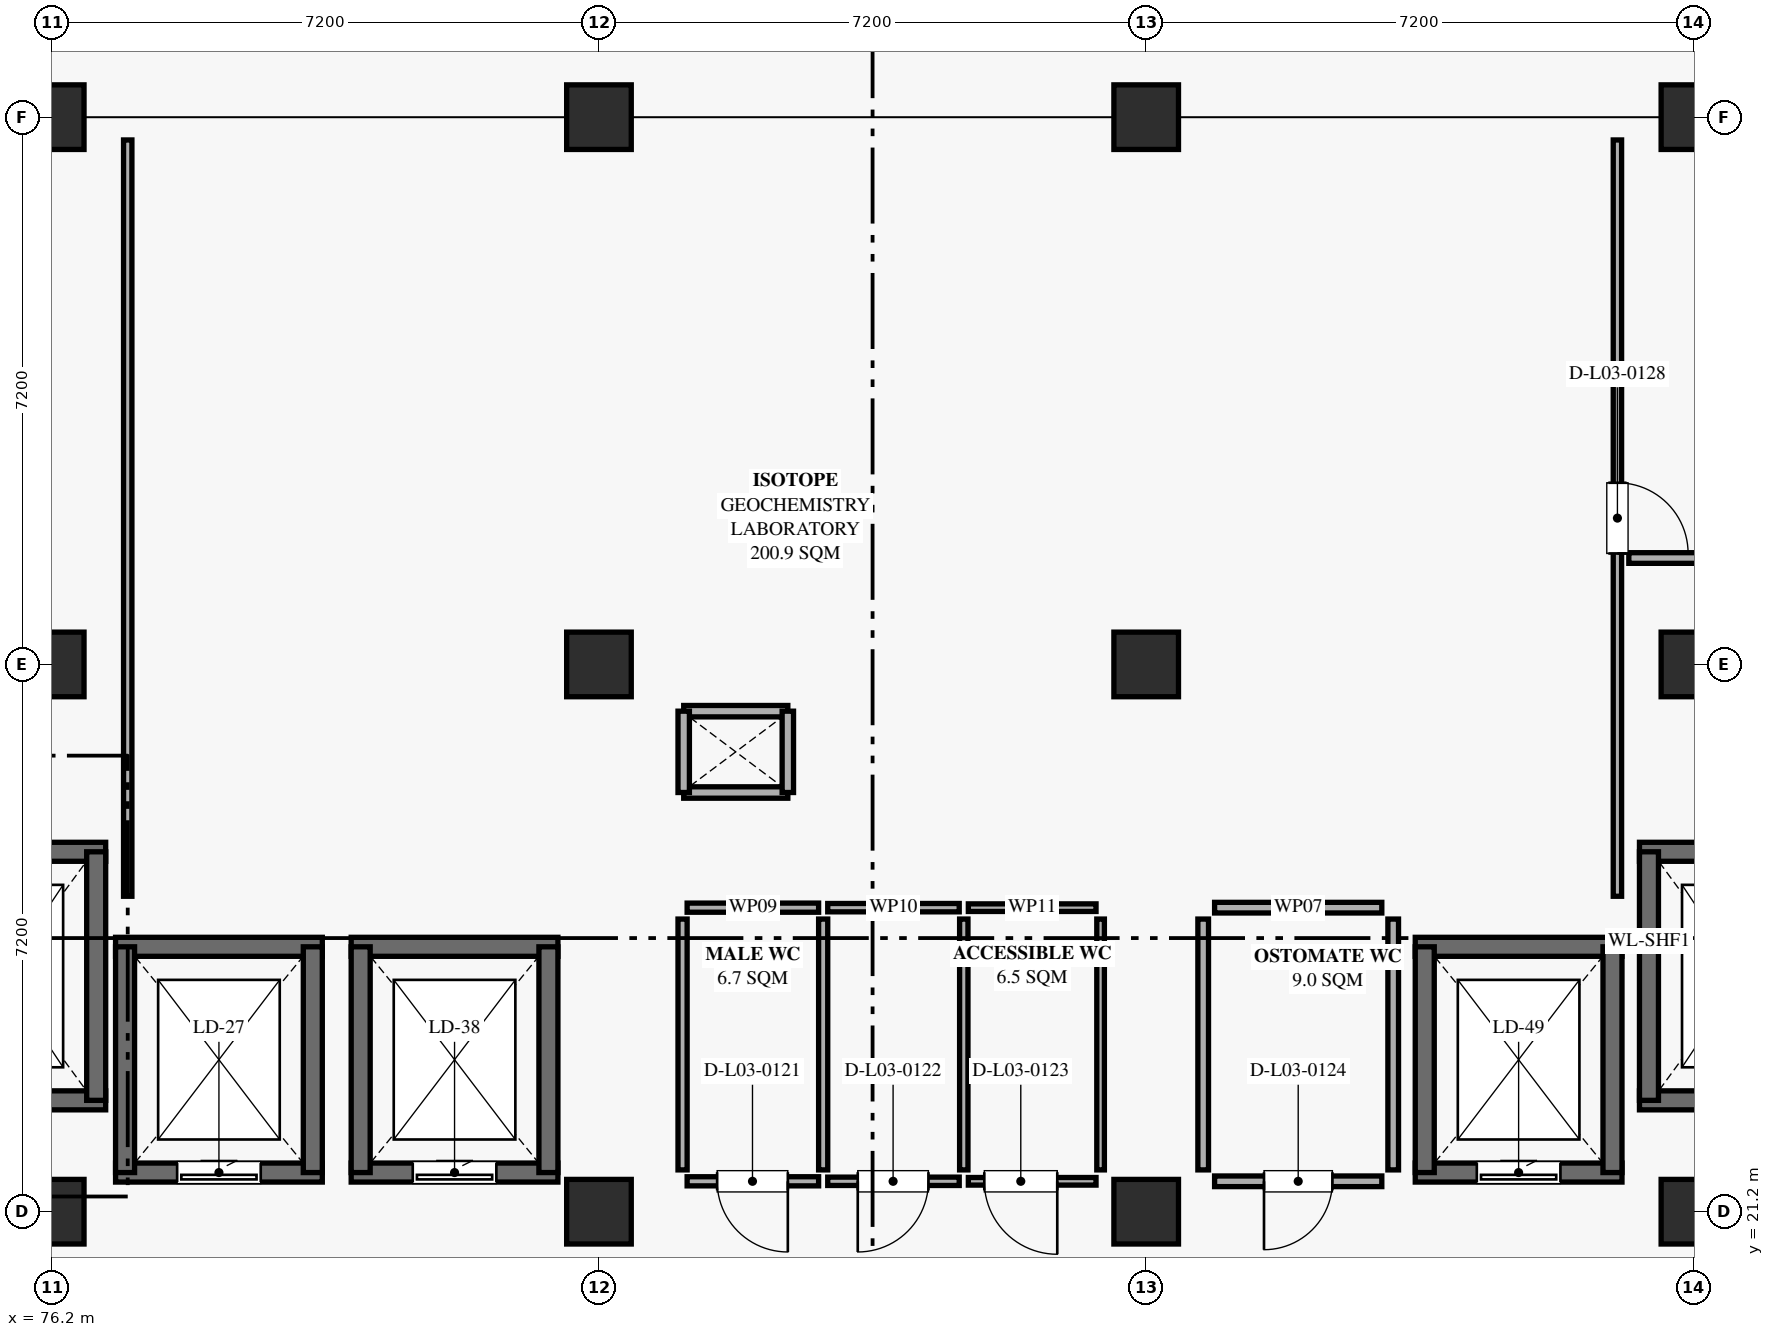
"""IFC4 building model, lengths in metres.
Left out: names, types, materials, properties, quantities, classifications, styles, units other than length and angle.
Written with IfcOpenShell. Run it as: python <this file> out.ifc"""

import sys

from ifc_helpers import new_model, si_unit, direction, frame, frame_2d, origin, origin_2d, place, context, subcontext, project, spatial, rectangle, extrude, element, fill, save


model = new_model("IFC4")
c1 = context("Model", 3, precision=1e-05, world=origin(), true_north=direction((0.0, 1.0)))
c2 = subcontext(c1, "Body", "Model", "MODEL_VIEW")
j1 = project(units=[si_unit("LENGTHUNIT", "METRE"), si_unit("PLANEANGLEUNIT", "RADIAN")], contexts=[c1])
p1 = place(None, origin())
s1 = spatial("IfcSite", under=j1, at=p1, CompositionType="ELEMENT")
p2 = place(p1, origin())
s2 = spatial("IfcBuilding", under=s1, at=p2, CompositionType="ELEMENT")
p3 = place(p2, frame((0.0, 0.0, 15.12)))
s3 = spatial("IfcBuildingStorey", under=s2, at=p3, CompositionType="ELEMENT", Elevation=15.12)
for number, where, z_axis, x_axis in (
    (1, (76.2, 21.2, 0.0), (0.0, 0.0, 1.0), (1.0, 0.0, 0.0)),
    (2, (83.4, 21.2, 0.0), (0.0, 0.0, 1.0), (1.0, 0.0, 0.0)),
    (3, (90.6, 21.2, 0.0), (0.0, 0.0, 1.0), (1.0, 0.0, 0.0)),
    (4, (97.8, 21.2, 0.0), (0.0, 0.0, 1.0), (1.0, 0.0, 0.0)),
    (5, (76.2, 28.4, 0.0), (0.0, 0.0, 1.0), (1.0, 0.0, 0.0)),
    (6, (83.4, 28.4, 0.0), (0.0, 0.0, 1.0), (1.0, 0.0, 0.0)),
    (7, (90.6, 28.4, 0.0), (0.0, 0.0, 1.0), (1.0, 0.0, 0.0)),
    (8, (97.8, 28.4, 0.0), (0.0, 0.0, 1.0), (1.0, 0.0, 0.0)),
    (9, (76.2, 35.6, 0.0), (0.0, 0.0, 1.0), (1.0, 0.0, 0.0)),
    (10, (83.4, 35.6, 0.0), (0.0, 0.0, 1.0), (1.0, 0.0, 0.0)),
    (11, (90.6, 35.6, 0.0), (0.0, 0.0, 1.0), (1.0, 0.0, 0.0)),
    (12, (97.8, 35.6, 0.0), (0.0, 0.0, 1.0), (1.0, 0.0, 0.0)),
):
    element("IfcColumn", number, at=place(p3, frame(where, z_axis=z_axis, x_axis=x_axis)), inside=s3, PredefinedType="COLUMN", context=c2, shape_type="SweptSolid", body=[
        extrude(rectangle(XDim=0.85, YDim=0.85, at=origin_2d()), origin(), (0.0, 0.0, 1.0), 4.68),
    ])
for number, where, z_axis, x_axis in (
    (13, (85.885, 26.715, 0.0), (0.0, 0.0, 1.0), (-1.0, 0.0, 0.0)),
    (14, (84.515, 27.785, 0.0), (0.0, 0.0, 1.0), (1.0, 0.0, 0.0)),
):
    element("IfcWall", number, at=place(p3, frame(where, z_axis=z_axis, x_axis=x_axis)), inside=s3, PredefinedType="PARTITIONING", context=c2, shape_type="SweptSolid", body=[
        extrude(rectangle(XDim=1.37, YDim=0.15, at=frame_2d((0.685, 0.0))), origin(), (0.0, 0.0, 1.0), 3.16),
    ])
for number, where, z_axis, x_axis in (
    (15, (84.515, 26.715, 0.0), (0.0, 0.0, 1.0), (0.0, 1.0, 0.0)),
    (16, (85.885, 27.785, 0.0), (0.0, 0.0, 1.0), (0.0, -1.0, 0.0)),
):
    element("IfcWall", number, at=place(p3, frame(where, z_axis=z_axis, x_axis=x_axis)), inside=s3, PredefinedType="PARTITIONING", context=c2, shape_type="SweptSolid", body=[
        extrude(rectangle(XDim=1.07, YDim=0.15, at=frame_2d((0.535, 0.0))), origin(), (0.0, 0.0, 1.0), 3.16),
    ])
for number, where, z_axis, x_axis in (
    (17, (76.91, 22.665, 0.0), (0.0, 0.0, 1.0), (-1.0, 0.0, 0.0)),
    (18, (74.19, 25.935, 0.0), (0.0, 0.0, 1.0), (1.0, 0.0, 0.0)),
):
    element("IfcWall", number, at=place(p3, frame(where, z_axis=z_axis, x_axis=x_axis)), inside=s3, PredefinedType="SHEAR", context=c2, shape_type="SweptSolid", body=[
        extrude(rectangle(XDim=2.72, YDim=0.25, at=frame_2d((1.36, 0.0))), origin(), (0.0, 0.0, 1.0), 4.41),
    ])
p4 = place(p3, frame((76.785, 25.935, 0.0), z_axis=(0.0, 0.0, 1.0), x_axis=(0.0, -1.0, 0.0)))
e19 = element("IfcWall", 19, at=p4, inside=s3, PredefinedType="SHEAR", context=c2, shape_type="SweptSolid", body=[
    extrude(rectangle(XDim=3.27, YDim=0.25, at=frame_2d((1.635, 0.0))), origin(), (0.0, 0.0, 1.0), 4.41),
])
for number, where, z_axis, x_axis in (
    (20, (99.81, 22.665, 0.0), (0.0, 0.0, 1.0), (-1.0, 0.0, 0.0)),
    (21, (97.09, 25.935, 0.0), (0.0, 0.0, 1.0), (1.0, 0.0, 0.0)),
):
    element("IfcWall", number, at=place(p3, frame(where, z_axis=z_axis, x_axis=x_axis)), inside=s3, PredefinedType="SHEAR", context=c2, shape_type="SweptSolid", body=[
        extrude(rectangle(XDim=2.72, YDim=0.25, at=frame_2d((1.36, 0.0))), origin(), (0.0, 0.0, 1.0), 4.41),
    ])
p5 = place(p3, frame((97.215, 22.665, 0.0), z_axis=(0.0, 0.0, 1.0), x_axis=(0.0, 1.0, 0.0)))
e22 = element("IfcWall", 22, at=p5, inside=s3, PredefinedType="SHEAR", context=c2, shape_type="SweptSolid", body=[
    extrude(rectangle(XDim=3.27, YDim=0.25, at=frame_2d((1.635, 0.0))), origin(), (0.0, 0.0, 1.0), 4.41),
])
p6 = place(p3, frame((79.76, 21.715, 0.0), z_axis=(0.0, 0.0, 1.0), x_axis=(-1.0, 0.0, 0.0)))
e23 = element("IfcWall", 23, at=p6, inside=s3, PredefinedType="SHEAR", context=c2, shape_type="SweptSolid", body=[
    extrude(rectangle(XDim=2.72, YDim=0.25, at=frame_2d((1.36, 0.0))), origin(), (0.0, 0.0, 1.0), 4.41),
])
p7 = place(p6, frame((0.81, 0.0, 0.0)))
e24 = element("IfcOpeningElement", 24, at=p7, cuts=e23, PredefinedType="OPENING", context=c2, shape_type="SweptSolid", body=[
    extrude(rectangle(XDim=1.1, YDim=2.2, at=frame_2d((0.55, 1.1))), frame((0.0, 0.135, 0.0), z_axis=(0.0, -1.0, 0.0), x_axis=(1.0, 0.0, 0.0)), (0.0, 0.0, 1.0), 0.27),
])
p8 = place(p3, frame((77.04, 24.685, 0.0), z_axis=(0.0, 0.0, 1.0), x_axis=(1.0, 0.0, 0.0)))
e25 = element("IfcWall", 25, at=p8, inside=s3, PredefinedType="SHEAR", context=c2, shape_type="SweptSolid", body=[
    extrude(rectangle(XDim=2.72, YDim=0.25, at=frame_2d((1.36, 0.0))), origin(), (0.0, 0.0, 1.0), 4.41),
])
for number, where, z_axis, x_axis in (
    (26, (77.165, 21.715, 0.0), (0.0, 0.0, 1.0), (0.0, 1.0, 0.0)),
    (27, (79.635, 24.685, 0.0), (0.0, 0.0, 1.0), (0.0, -1.0, 0.0)),
):
    element("IfcWall", number, at=place(p3, frame(where, z_axis=z_axis, x_axis=x_axis)), inside=s3, PredefinedType="SHEAR", context=c2, shape_type="SweptSolid", body=[
        extrude(rectangle(XDim=2.97, YDim=0.25, at=frame_2d((1.485, 0.0))), origin(), (0.0, 0.0, 1.0), 4.41),
    ])
p9 = place(p3, frame((82.86, 21.715, 0.0), z_axis=(0.0, 0.0, 1.0), x_axis=(-1.0, 0.0, 0.0)))
e28 = element("IfcWall", 28, at=p9, inside=s3, PredefinedType="SHEAR", context=c2, shape_type="SweptSolid", body=[
    extrude(rectangle(XDim=2.72, YDim=0.25, at=frame_2d((1.36, 0.0))), origin(), (0.0, 0.0, 1.0), 4.41),
])
p10 = place(p9, frame((0.81, 0.0, 0.0)))
e29 = element("IfcOpeningElement", 29, at=p10, cuts=e28, PredefinedType="OPENING", context=c2, shape_type="SweptSolid", body=[
    extrude(rectangle(XDim=1.1, YDim=2.2, at=frame_2d((0.55, 1.1))), frame((0.0, 0.135, 0.0), z_axis=(0.0, -1.0, 0.0), x_axis=(1.0, 0.0, 0.0)), (0.0, 0.0, 1.0), 0.27),
])
p11 = place(p3, frame((80.14, 24.685, 0.0), z_axis=(0.0, 0.0, 1.0), x_axis=(1.0, 0.0, 0.0)))
e30 = element("IfcWall", 30, at=p11, inside=s3, PredefinedType="SHEAR", context=c2, shape_type="SweptSolid", body=[
    extrude(rectangle(XDim=2.72, YDim=0.25, at=frame_2d((1.36, 0.0))), origin(), (0.0, 0.0, 1.0), 4.41),
])
for number, where, z_axis, x_axis in (
    (31, (80.265, 21.715, 0.0), (0.0, 0.0, 1.0), (0.0, 1.0, 0.0)),
    (32, (82.735, 24.685, 0.0), (0.0, 0.0, 1.0), (0.0, -1.0, 0.0)),
):
    element("IfcWall", number, at=place(p3, frame(where, z_axis=z_axis, x_axis=x_axis)), inside=s3, PredefinedType="SHEAR", context=c2, shape_type="SweptSolid", body=[
        extrude(rectangle(XDim=2.97, YDim=0.25, at=frame_2d((1.485, 0.0))), origin(), (0.0, 0.0, 1.0), 4.41),
    ])
p12 = place(p3, frame((96.86, 21.715, 0.0), z_axis=(0.0, 0.0, 1.0), x_axis=(-1.0, 0.0, 0.0)))
e33 = element("IfcWall", 33, at=p12, inside=s3, PredefinedType="SHEAR", context=c2, shape_type="SweptSolid", body=[
    extrude(rectangle(XDim=2.72, YDim=0.25, at=frame_2d((1.36, 0.0))), origin(), (0.0, 0.0, 1.0), 4.41),
])
p13 = place(p12, frame((0.81, 0.0, 0.0)))
e34 = element("IfcOpeningElement", 34, at=p13, cuts=e33, PredefinedType="OPENING", context=c2, shape_type="SweptSolid", body=[
    extrude(rectangle(XDim=1.1, YDim=2.2, at=frame_2d((0.55, 1.1))), frame((0.0, 0.135, 0.0), z_axis=(0.0, -1.0, 0.0), x_axis=(1.0, 0.0, 0.0)), (0.0, 0.0, 1.0), 0.27),
])
p14 = place(p3, frame((94.14, 24.685, 0.0), z_axis=(0.0, 0.0, 1.0), x_axis=(1.0, 0.0, 0.0)))
e35 = element("IfcWall", 35, at=p14, inside=s3, PredefinedType="SHEAR", context=c2, shape_type="SweptSolid", body=[
    extrude(rectangle(XDim=2.72, YDim=0.25, at=frame_2d((1.36, 0.0))), origin(), (0.0, 0.0, 1.0), 4.41),
])
for number, where, z_axis, x_axis in (
    (36, (94.265, 21.715, 0.0), (0.0, 0.0, 1.0), (0.0, 1.0, 0.0)),
    (37, (96.735, 24.685, 0.0), (0.0, 0.0, 1.0), (0.0, -1.0, 0.0)),
):
    element("IfcWall", number, at=place(p3, frame(where, z_axis=z_axis, x_axis=x_axis)), inside=s3, PredefinedType="SHEAR", context=c2, shape_type="SweptSolid", body=[
        extrude(rectangle(XDim=2.97, YDim=0.25, at=frame_2d((1.485, 0.0))), origin(), (0.0, 0.0, 1.0), 4.41),
    ])
p15 = place(p3, frame((86.29, 21.6, 0.0), z_axis=(0.0, 0.0, 1.0), x_axis=(-1.0, 0.0, 0.0)))
e38 = element("IfcWall", 38, at=p15, inside=s3, PredefinedType="PARTITIONING", context=c2, shape_type="SweptSolid", body=[
    extrude(rectangle(XDim=1.73, YDim=0.12, at=frame_2d((0.865, 0.0))), origin(), (0.0, 0.0, 1.0), 3.16),
])
p16 = place(p15, frame((0.405, 0.0, 0.0)))
e39 = element("IfcOpeningElement", 39, at=p16, cuts=e38, PredefinedType="OPENING", context=c2, shape_type="SweptSolid", body=[
    extrude(rectangle(XDim=0.93, YDim=2.16, at=frame_2d((0.465, 1.08))), frame((0.0, 0.07, 0.0), z_axis=(0.0, -1.0, 0.0), x_axis=(1.0, 0.0, 0.0)), (0.0, 0.0, 1.0), 0.14),
])
p17 = place(p3, frame((84.56, 25.2, 0.0), z_axis=(0.0, 0.0, 1.0), x_axis=(1.0, 0.0, 0.0)))
e40 = element("IfcWall", 40, at=p17, inside=s3, PredefinedType="PARTITIONING", context=c2, shape_type="SweptSolid", body=[
    extrude(rectangle(XDim=1.73, YDim=0.12, at=frame_2d((0.865, 0.0))), origin(), (0.0, 0.0, 1.0), 3.16),
])
for number, where, z_axis, x_axis in (
    (41, (84.5, 21.75, 0.0), (0.0, 0.0, 1.0), (0.0, 1.0, 0.0)),
    (42, (86.35, 25.05, 0.0), (0.0, 0.0, 1.0), (0.0, -1.0, 0.0)),
):
    element("IfcWall", number, at=place(p3, frame(where, z_axis=z_axis, x_axis=x_axis)), inside=s3, PredefinedType="PARTITIONING", context=c2, shape_type="SweptSolid", body=[
        extrude(rectangle(XDim=3.3, YDim=0.12, at=frame_2d((1.65, 0.0))), origin(), (0.0, 0.0, 1.0), 3.16),
    ])
p18 = place(p3, frame((88.14, 21.6, 0.0), z_axis=(0.0, 0.0, 1.0), x_axis=(-1.0, 0.0, 0.0)))
e43 = element("IfcWall", 43, at=p18, inside=s3, PredefinedType="PARTITIONING", context=c2, shape_type="SweptSolid", body=[
    extrude(rectangle(XDim=1.73, YDim=0.11, at=frame_2d((0.865, 0.0))), origin(), (0.0, 0.0, 1.0), 3.16),
])
p19 = place(p18, frame((0.405, 0.0, 0.0)))
e44 = element("IfcOpeningElement", 44, at=p19, cuts=e43, PredefinedType="OPENING", context=c2, shape_type="SweptSolid", body=[
    extrude(rectangle(XDim=0.93, YDim=2.22, at=frame_2d((0.465, 1.11))), frame((0.0, 0.065, 0.0), z_axis=(0.0, -1.0, 0.0), x_axis=(1.0, 0.0, 0.0)), (0.0, 0.0, 1.0), 0.13),
])
p20 = place(p3, frame((86.41, 25.2, 0.0), z_axis=(0.0, 0.0, 1.0), x_axis=(1.0, 0.0, 0.0)))
e45 = element("IfcWall", 45, at=p20, inside=s3, PredefinedType="PARTITIONING", context=c2, shape_type="SweptSolid", body=[
    extrude(rectangle(XDim=1.73, YDim=0.11, at=frame_2d((0.865, 0.0))), origin(), (0.0, 0.0, 1.0), 3.16),
])
p21 = place(p3, frame((88.2, 25.05, 0.0), z_axis=(0.0, 0.0, 1.0), x_axis=(0.0, -1.0, 0.0)))
e46 = element("IfcWall", 46, at=p21, inside=s3, PredefinedType="PARTITIONING", context=c2, shape_type="SweptSolid", body=[
    extrude(rectangle(XDim=3.3, YDim=0.11, at=frame_2d((1.65, 0.0))), origin(), (0.0, 0.0, 1.0), 3.16),
])
p22 = place(p3, frame((89.94, 21.6, 0.0), z_axis=(0.0, 0.0, 1.0), x_axis=(-1.0, 0.0, 0.0)))
e47 = element("IfcWall", 47, at=p22, inside=s3, PredefinedType="PARTITIONING", context=c2, shape_type="SweptSolid", body=[
    extrude(rectangle(XDim=1.68, YDim=0.1, at=frame_2d((0.84, 0.0))), origin(), (0.0, 0.0, 1.0), 3.16),
])
p23 = place(p22, frame((0.51, 0.0, 0.0)))
e48 = element("IfcOpeningElement", 48, at=p23, cuts=e47, PredefinedType="OPENING", context=c2, shape_type="SweptSolid", body=[
    extrude(rectangle(XDim=0.96, YDim=2.05, at=frame_2d((0.48, 1.025))), frame((0.0, 0.06, 0.0), z_axis=(0.0, -1.0, 0.0), x_axis=(1.0, 0.0, 0.0)), (0.0, 0.0, 1.0), 0.12),
])
p24 = place(p3, frame((88.26, 25.2, 0.0), z_axis=(0.0, 0.0, 1.0), x_axis=(1.0, 0.0, 0.0)))
e49 = element("IfcWall", 49, at=p24, inside=s3, PredefinedType="PARTITIONING", context=c2, shape_type="SweptSolid", body=[
    extrude(rectangle(XDim=1.68, YDim=0.1, at=frame_2d((0.84, 0.0))), origin(), (0.0, 0.0, 1.0), 3.16),
])
p25 = place(p3, frame((90.0, 25.05, 0.0), z_axis=(0.0, 0.0, 1.0), x_axis=(0.0, -1.0, 0.0)))
e50 = element("IfcWall", 50, at=p25, inside=s3, PredefinedType="PARTITIONING", context=c2, shape_type="SweptSolid", body=[
    extrude(rectangle(XDim=3.3, YDim=0.1, at=frame_2d((1.65, 0.0))), origin(), (0.0, 0.0, 1.0), 3.16),
])
p26 = place(p3, frame((93.7, 21.6, 0.0), z_axis=(0.0, 0.0, 1.0), x_axis=(-1.0, 0.0, 0.0)))
e51 = element("IfcWall", 51, at=p26, inside=s3, PredefinedType="PARTITIONING", context=c2, shape_type="SweptSolid", body=[
    extrude(rectangle(XDim=2.2, YDim=0.14, at=frame_2d((1.1, 0.0))), origin(), (0.0, 0.0, 1.0), 3.16),
])
p27 = place(p26, frame((0.65, 0.0, 0.0)))
e52 = element("IfcOpeningElement", 52, at=p27, cuts=e51, PredefinedType="OPENING", context=c2, shape_type="SweptSolid", body=[
    extrude(rectangle(XDim=0.9, YDim=2.1, at=frame_2d((0.45, 1.05))), frame((0.0, 0.08, 0.0), z_axis=(0.0, -1.0, 0.0), x_axis=(1.0, 0.0, 0.0)), (0.0, 0.0, 1.0), 0.16),
])
p28 = place(p3, frame((91.5, 25.2, 0.0), z_axis=(0.0, 0.0, 1.0), x_axis=(1.0, 0.0, 0.0)))
e53 = element("IfcWall", 53, at=p28, inside=s3, PredefinedType="PARTITIONING", context=c2, shape_type="SweptSolid", body=[
    extrude(rectangle(XDim=2.2, YDim=0.14, at=frame_2d((1.1, 0.0))), origin(), (0.0, 0.0, 1.0), 3.16),
])
for number, where, z_axis, x_axis in (
    (54, (91.35, 21.75, 0.0), (0.0, 0.0, 1.0), (0.0, 1.0, 0.0)),
    (55, (93.85, 25.05, 0.0), (0.0, 0.0, 1.0), (0.0, -1.0, 0.0)),
):
    element("IfcWall", number, at=place(p3, frame(where, z_axis=z_axis, x_axis=x_axis)), inside=s3, PredefinedType="PARTITIONING", context=c2, shape_type="SweptSolid", body=[
        extrude(rectangle(XDim=3.3, YDim=0.14, at=frame_2d((1.65, 0.0))), origin(), (0.0, 0.0, 1.0), 3.16),
    ])
p29 = place(p3, frame((77.2, 25.35, 0.0), z_axis=(0.0, 0.0, 1.0), x_axis=(0.0, 1.0, 0.0)))
e56 = element("IfcWall", 56, at=p29, inside=s3, PredefinedType="PARTITIONING", context=c2, shape_type="SweptSolid", body=[
    extrude(rectangle(XDim=9.95, YDim=0.11, at=frame_2d((4.975, 0.0))), origin(), (0.0, 0.0, 1.0), 3.16),
])
p30 = place(p3, frame((96.8, 35.3, 0.0), z_axis=(0.0, 0.0, 1.0), x_axis=(0.0, -1.0, 0.0)))
e57 = element("IfcWall", 57, at=p30, inside=s3, PredefinedType="PARTITIONING", context=c2, shape_type="SweptSolid", body=[
    extrude(rectangle(XDim=9.95, YDim=0.11, at=frame_2d((4.975, 0.0))), origin(), (0.0, 0.0, 1.0), 3.16),
])
p31 = place(p30, frame((4.51, 0.0, 0.0)))
e58 = element("IfcOpeningElement", 58, at=p31, cuts=e57, PredefinedType="OPENING", context=c2, shape_type="SweptSolid", body=[
    extrude(rectangle(XDim=0.93, YDim=2.1, at=frame_2d((0.465, 1.05))), frame((0.0, 0.065, 0.0), z_axis=(0.0, -1.0, 0.0), x_axis=(1.0, 0.0, 0.0)), (0.0, 0.0, 1.0), 0.13),
])
p32 = place(p3, frame((111.03, 29.8, 0.0), z_axis=(0.0, 0.0, 1.0), x_axis=(-1.0, 0.0, 0.0)))
e59 = element("IfcWall", 59, at=p32, inside=s3, PredefinedType="PARTITIONING", context=c2, shape_type="SweptSolid", body=[
    extrude(rectangle(XDim=14.08, YDim=0.14, at=frame_2d((7.04, 0.0))), origin(), (0.0, 0.0, 1.0), 3.16),
])
p33 = place(p32, frame((9.165, 0.0, 0.0)))
e60 = element("IfcOpeningElement", 60, at=p33, cuts=e59, PredefinedType="OPENING", context=c2, shape_type="SweptSolid", body=[
    extrude(rectangle(XDim=0.93, YDim=2.16, at=frame_2d((0.465, 1.08))), frame((0.0, 0.08, 0.0), z_axis=(0.0, -1.0, 0.0), x_axis=(1.0, 0.0, 0.0)), (0.0, 0.0, 1.0), 0.16),
])
p34 = place(p7, origin())
e61 = element("IfcDoor", 61, at=p34, inside=s3, OperationType="SLIDING_TO_LEFT", PredefinedType="DOOR", context=c2, shape_type="SweptSolid", body=[
    extrude(rectangle(XDim=1.1, YDim=2.2, at=frame_2d((0.55, 1.1))), frame((0.0, 0.025, 0.0), z_axis=(0.0, -1.0, 0.0), x_axis=(1.0, 0.0, 0.0)), (0.0, 0.0, 1.0), 0.05),
])
fill(e24, e61)
p35 = place(p10, origin())
e62 = element("IfcDoor", 62, at=p35, inside=s3, OperationType="SLIDING_TO_LEFT", PredefinedType="DOOR", context=c2, shape_type="SweptSolid", body=[
    extrude(rectangle(XDim=1.1, YDim=2.2, at=frame_2d((0.55, 1.1))), frame((0.0, 0.025, 0.0), z_axis=(0.0, -1.0, 0.0), x_axis=(1.0, 0.0, 0.0)), (0.0, 0.0, 1.0), 0.05),
])
fill(e29, e62)
p36 = place(p13, origin())
e63 = element("IfcDoor", 63, at=p36, inside=s3, OperationType="SLIDING_TO_LEFT", PredefinedType="DOOR", context=c2, shape_type="SweptSolid", body=[
    extrude(rectangle(XDim=1.1, YDim=2.2, at=frame_2d((0.55, 1.1))), frame((0.0, 0.025, 0.0), z_axis=(0.0, -1.0, 0.0), x_axis=(1.0, 0.0, 0.0)), (0.0, 0.0, 1.0), 0.05),
])
fill(e34, e63)
p37 = place(p16, origin())
e64 = element("IfcDoor", 64, at=p37, inside=s3, OperationType="SINGLE_SWING_LEFT", PredefinedType="DOOR", context=c2, shape_type="SweptSolid", body=[
    extrude(rectangle(XDim=0.93, YDim=2.16, at=frame_2d((0.465, 1.08))), frame((0.0, 0.025, 0.0), z_axis=(0.0, -1.0, 0.0), x_axis=(1.0, 0.0, 0.0)), (0.0, 0.0, 1.0), 0.05),
])
fill(e39, e64)
p38 = place(p19, origin())
e65 = element("IfcDoor", 65, at=p38, inside=s3, OperationType="SINGLE_SWING_RIGHT", PredefinedType="DOOR", context=c2, shape_type="SweptSolid", body=[
    extrude(rectangle(XDim=0.93, YDim=2.22, at=frame_2d((0.465, 1.11))), frame((0.0, 0.025, 0.0), z_axis=(0.0, -1.0, 0.0), x_axis=(1.0, 0.0, 0.0)), (0.0, 0.0, 1.0), 0.05),
])
fill(e44, e65)
p39 = place(p23, origin())
e66 = element("IfcDoor", 66, at=p39, inside=s3, OperationType="SINGLE_SWING_LEFT", PredefinedType="DOOR", context=c2, shape_type="SweptSolid", body=[
    extrude(rectangle(XDim=0.96, YDim=2.05, at=frame_2d((0.48, 1.025))), frame((0.0, 0.025, 0.0), z_axis=(0.0, -1.0, 0.0), x_axis=(1.0, 0.0, 0.0)), (0.0, 0.0, 1.0), 0.05),
])
fill(e48, e66)
p40 = place(p27, origin())
e67 = element("IfcDoor", 67, at=p40, inside=s3, OperationType="SINGLE_SWING_RIGHT", PredefinedType="DOOR", context=c2, shape_type="SweptSolid", body=[
    extrude(rectangle(XDim=0.9, YDim=2.1, at=frame_2d((0.45, 1.05))), frame((0.0, 0.025, 0.0), z_axis=(0.0, -1.0, 0.0), x_axis=(1.0, 0.0, 0.0)), (0.0, 0.0, 1.0), 0.05),
])
fill(e52, e67)
p41 = place(p31, origin())
e68 = element("IfcDoor", 68, at=p41, inside=s3, OperationType="SINGLE_SWING_RIGHT", PredefinedType="DOOR", context=c2, shape_type="SweptSolid", body=[
    extrude(rectangle(XDim=0.93, YDim=2.1, at=frame_2d((0.465, 1.05))), frame((0.0, 0.025, 0.0), z_axis=(0.0, -1.0, 0.0), x_axis=(1.0, 0.0, 0.0)), (0.0, 0.0, 1.0), 0.05),
])
fill(e58, e68)
save(model, sys.argv[1])
